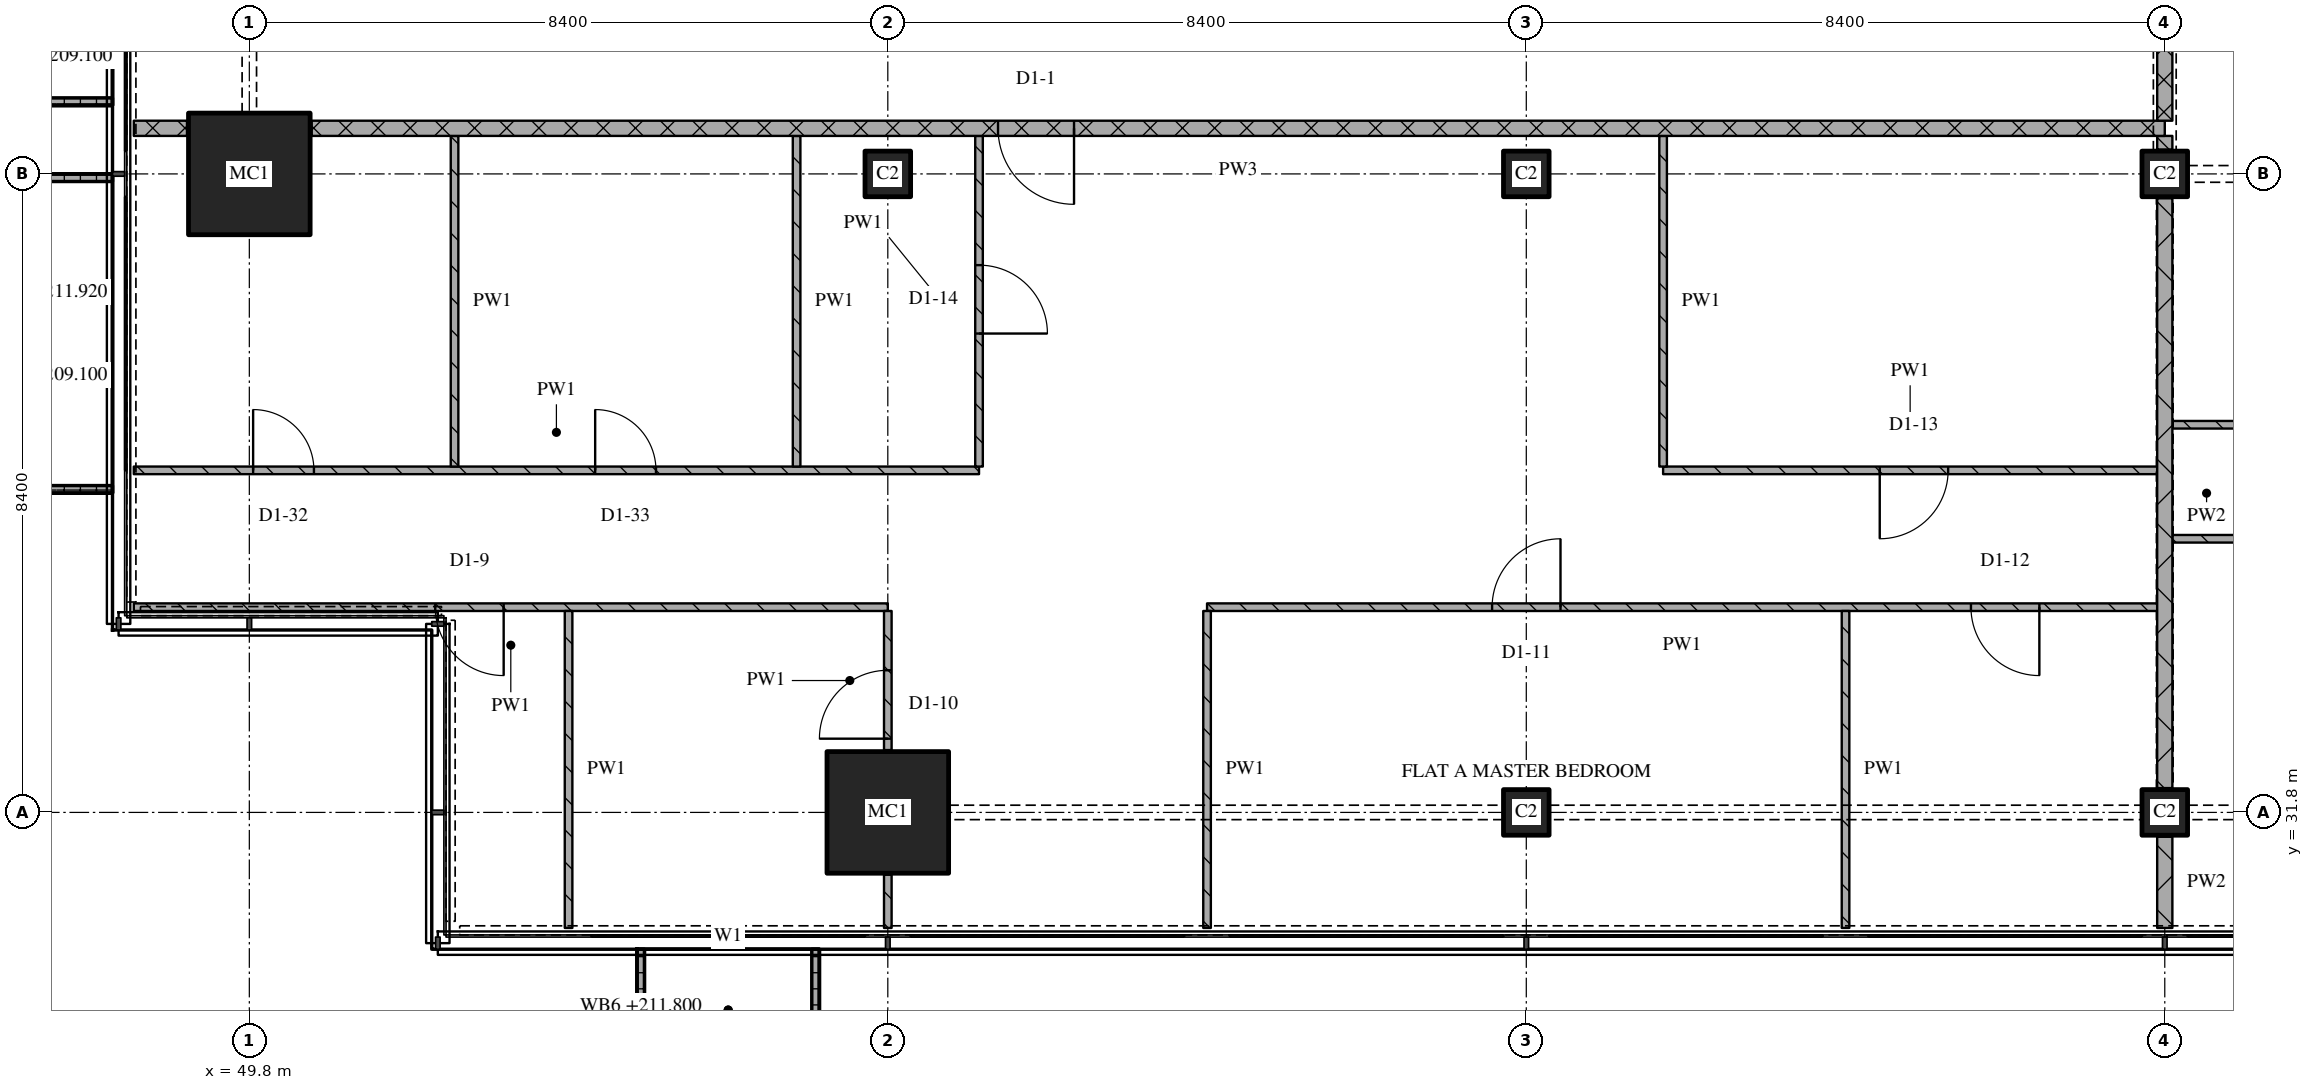
"""IFC4 building model, lengths in metres.
Left out: names, types, materials, properties, quantities, classifications, styles, units other than length and angle.
Written with IfcOpenShell. Run it as: python <this file> out.ifc"""

import sys

from ifc_helpers import new_model, si_unit, direction, frame, frame_2d, origin, origin_2d, place, context, subcontext, project, spatial, polyline, rectangle, outline, extrude, element, fill, save


model = new_model("IFC4")
c1 = context("Model", 3, precision=1e-05, world=origin(), true_north=direction((0.0, 1.0)))
c2 = subcontext(c1, "Body", "Model", "MODEL_VIEW")
j1 = project(units=[si_unit("LENGTHUNIT", "METRE"), si_unit("PLANEANGLEUNIT", "RADIAN")], contexts=[c1])
p1 = place(None, origin())
s1 = spatial("IfcSite", under=j1, at=p1, CompositionType="ELEMENT")
p2 = place(p1, origin())
s2 = spatial("IfcBuilding", under=s1, at=p2, CompositionType="ELEMENT")
p3 = place(p2, frame((0.0, 0.0, 209.1)))
s3 = spatial("IfcBuildingStorey", under=s2, at=p3, CompositionType="ELEMENT", Elevation=209.1)
for number, where, z_axis, x_axis in (
    (1, (49.8, 40.2, 0.0), (0.0, 0.0, 1.0), (1.0, 0.0, 0.0)),
    (2, (58.2, 31.8, 0.0), (0.0, 0.0, 1.0), (1.0, 0.0, 0.0)),
):
    element("IfcColumn", number, at=place(p3, frame(where, z_axis=z_axis, x_axis=x_axis)), inside=s3, PredefinedType="COLUMN", context=c2, shape_type="SweptSolid", body=[
        extrude(rectangle(XDim=1.6, YDim=1.6, at=origin_2d()), origin(), (0.0, 0.0, 1.0), 3.6),
    ])
for number, where, z_axis, x_axis in (
    (3, (58.2, 40.2, 0.0), (0.0, 0.0, 1.0), (1.0, 0.0, 0.0)),
    (4, (66.6, 31.8, 0.0), (0.0, 0.0, 1.0), (1.0, 0.0, 0.0)),
    (5, (66.6, 40.2, 0.0), (0.0, 0.0, 1.0), (1.0, 0.0, 0.0)),
    (6, (75.0, 31.8, 0.0), (0.0, 0.0, 1.0), (1.0, 0.0, 0.0)),
    (7, (75.0, 40.2, 0.0), (0.0, 0.0, 1.0), (1.0, 0.0, 0.0)),
):
    element("IfcColumn", number, at=place(p3, frame(where, z_axis=z_axis, x_axis=x_axis)), inside=s3, PredefinedType="COLUMN", context=c2, shape_type="SweptSolid", body=[
        extrude(rectangle(XDim=0.6, YDim=0.6, at=origin_2d()), origin(), (0.0, 0.0, 1.0), 3.6),
    ])
p4 = place(p3, origin())
e8 = element("IfcWall", 8, at=p4, inside=s3, PredefinedType="SOLIDWALL", context=c2, shape_type="SweptSolid", body=[
    extrude(outline(polyline([(54.9, 30.0), (55.0, 30.0), (55.0, 28.5), (57.2, 28.5), (57.2, 30.0), (57.3, 30.0), (57.3, 28.4), (54.9, 28.4), (54.9, 30.0)])), origin(), (0.0, 0.0, 1.0), 1.0),
])
p5 = place(p3, origin())
e9 = element("IfcWall", 9, at=p5, inside=s3, PredefinedType="SOLIDWALL", context=c2, shape_type="SweptSolid", body=[
    extrude(outline(polyline([(48.0, 43.5), (48.0, 43.4), (46.5, 43.4), (46.5, 41.2), (48.0, 41.2), (48.0, 41.1), (46.4, 41.1), (46.4, 43.5), (48.0, 43.5)])), origin(), (0.0, 0.0, 1.0), 1.0),
])
p6 = place(p3, origin())
e10 = element("IfcWall", 10, at=p6, inside=s3, PredefinedType="SOLIDWALL", context=c2, shape_type="SweptSolid", body=[
    extrude(outline(polyline([(48.0, 40.2), (48.0, 40.1), (46.367, 40.1), (46.367, 36.1), (48.0, 36.1), (48.0, 36.0), (46.267, 36.0), (46.267, 40.2), (48.0, 40.2)])), origin(), (0.0, 0.0, 1.0), 1.0),
])
p7 = place(p3, frame((58.2, 34.5, 0.0), z_axis=(0.0, 0.0, 1.0), x_axis=(-1.0, 0.0, 0.0)))
e11 = element("IfcWall", 11, at=p7, inside=s3, PredefinedType="PARTITIONING", context=c2, shape_type="SweptSolid", body=[
    extrude(rectangle(XDim=9.92, YDim=0.1, at=frame_2d((4.96, 0.0))), origin(), (0.0, 0.0, 1.0), 3.32),
])
p8 = place(p7, frame((5.054, 0.0, 0.0)))
e12 = element("IfcOpeningElement", 12, at=p8, cuts=e11, PredefinedType="OPENING", context=c2, shape_type="SweptSolid", body=[
    extrude(rectangle(XDim=0.9, YDim=2.1, at=frame_2d((0.45, 1.05))), frame((0.0, 0.06, 0.0), z_axis=(0.0, -1.0, 0.0), x_axis=(1.0, 0.0, 0.0)), (0.0, 0.0, 1.0), 0.12),
])
p9 = place(p3, frame((74.9, 34.5, 0.0), z_axis=(0.0, 0.0, 1.0), x_axis=(-1.0, 0.0, 0.0)))
e13 = element("IfcWall", 13, at=p9, inside=s3, PredefinedType="PARTITIONING", context=c2, shape_type="SweptSolid", body=[
    extrude(rectangle(XDim=12.5, YDim=0.1, at=frame_2d((6.25, 0.0))), origin(), (0.0, 0.0, 1.0), 3.32),
])
p10 = place(p9, frame((1.55, 0.0, 0.0)))
e14 = element("IfcOpeningElement", 14, at=p10, cuts=e13, PredefinedType="OPENING", context=c2, shape_type="SweptSolid", body=[
    extrude(rectangle(XDim=0.9, YDim=2.1, at=frame_2d((0.45, 1.05))), frame((0.0, 0.06, 0.0), z_axis=(0.0, -1.0, 0.0), x_axis=(1.0, 0.0, 0.0)), (0.0, 0.0, 1.0), 0.12),
])
p11 = place(p9, frame((7.85, 0.0, 0.0)))
e15 = element("IfcOpeningElement", 15, at=p11, cuts=e13, PredefinedType="OPENING", context=c2, shape_type="SweptSolid", body=[
    extrude(rectangle(XDim=0.9, YDim=2.1, at=frame_2d((0.45, 1.05))), frame((0.0, 0.06, 0.0), z_axis=(0.0, -1.0, 0.0), x_axis=(1.0, 0.0, 0.0)), (0.0, 0.0, 1.0), 0.12),
])
p12 = place(p3, frame((75.1, 35.4, 0.0), z_axis=(0.0, 0.0, 1.0), x_axis=(1.0, 0.0, 0.0)))
e16 = element("IfcWall", 16, at=p12, inside=s3, PredefinedType="PARTITIONING", context=c2, shape_type="SweptSolid", body=[
    extrude(rectangle(XDim=8.3, YDim=0.1, at=frame_2d((4.15, 0.0))), origin(), (0.0, 0.0, 1.0), 3.32),
])
p13 = place(p3, frame((48.28, 36.3, 0.0), z_axis=(0.0, 0.0, 1.0), x_axis=(1.0, 0.0, 0.0)))
e17 = element("IfcWall", 17, at=p13, inside=s3, PredefinedType="PARTITIONING", context=c2, shape_type="SweptSolid", body=[
    extrude(rectangle(XDim=11.12, YDim=0.1, at=frame_2d((5.56, 0.0))), origin(), (0.0, 0.0, 1.0), 3.32),
])
p14 = place(p13, frame((1.57, 0.0, 0.0)))
e18 = element("IfcOpeningElement", 18, at=p14, cuts=e17, PredefinedType="OPENING", context=c2, shape_type="SweptSolid", body=[
    extrude(rectangle(XDim=0.8, YDim=2.1, at=frame_2d((0.4, 1.05))), frame((0.0, 0.06, 0.0), z_axis=(0.0, -1.0, 0.0), x_axis=(1.0, 0.0, 0.0)), (0.0, 0.0, 1.0), 0.12),
])
p15 = place(p13, frame((6.07, 0.0, 0.0)))
e19 = element("IfcOpeningElement", 19, at=p15, cuts=e17, PredefinedType="OPENING", context=c2, shape_type="SweptSolid", body=[
    extrude(rectangle(XDim=0.8, YDim=2.1, at=frame_2d((0.4, 1.05))), frame((0.0, 0.06, 0.0), z_axis=(0.0, -1.0, 0.0), x_axis=(1.0, 0.0, 0.0)), (0.0, 0.0, 1.0), 0.12),
])
p16 = place(p3, frame((68.4, 36.3, 0.0), z_axis=(0.0, 0.0, 1.0), x_axis=(1.0, 0.0, 0.0)))
e20 = element("IfcWall", 20, at=p16, inside=s3, PredefinedType="PARTITIONING", context=c2, shape_type="SweptSolid", body=[
    extrude(rectangle(XDim=6.5, YDim=0.1, at=frame_2d((3.25, 0.0))), origin(), (0.0, 0.0, 1.0), 3.32),
])
p17 = place(p16, frame((2.85, 0.0, 0.0)))
e21 = element("IfcOpeningElement", 21, at=p17, cuts=e20, PredefinedType="OPENING", context=c2, shape_type="SweptSolid", body=[
    extrude(rectangle(XDim=0.9, YDim=2.1, at=frame_2d((0.45, 1.05))), frame((0.0, 0.06, 0.0), z_axis=(0.0, -1.0, 0.0), x_axis=(1.0, 0.0, 0.0)), (0.0, 0.0, 1.0), 0.12),
])
p18 = place(p3, frame((75.1, 36.9, 0.0), z_axis=(0.0, 0.0, 1.0), x_axis=(1.0, 0.0, 0.0)))
e22 = element("IfcWall", 22, at=p18, inside=s3, PredefinedType="PARTITIONING", context=c2, shape_type="SweptSolid", body=[
    extrude(rectangle(XDim=6.5, YDim=0.1, at=frame_2d((3.25, 0.0))), origin(), (0.0, 0.0, 1.0), 3.32),
])
p19 = place(p18, frame((1.603, 0.0, 0.0)))
e23 = element("IfcOpeningElement", 23, at=p19, cuts=e22, PredefinedType="OPENING", context=c2, shape_type="SweptSolid", body=[
    extrude(rectangle(XDim=0.8, YDim=2.1, at=frame_2d((0.4, 1.05))), frame((0.0, 0.06, 0.0), z_axis=(0.0, -1.0, 0.0), x_axis=(1.0, 0.0, 0.0)), (0.0, 0.0, 1.0), 0.12),
])
p20 = place(p3, frame((48.28, 40.8, 0.0), z_axis=(0.0, 0.0, 1.0), x_axis=(1.0, 0.0, 0.0)))
e24 = element("IfcWall", 24, at=p20, inside=s3, PredefinedType="PARTITIONING", context=c2, shape_type="SweptSolid", body=[
    extrude(rectangle(XDim=0.7, YDim=0.2, at=frame_2d((0.35, 0.0))), origin(), (0.0, 0.0, 1.0), 3.32),
])
p21 = place(p3, frame((75.0, 40.8, 0.0), z_axis=(0.0, 0.0, 1.0), x_axis=(-1.0, 0.0, 0.0)))
e25 = element("IfcWall", 25, at=p21, inside=s3, PredefinedType="PARTITIONING", context=c2, shape_type="SweptSolid", body=[
    extrude(rectangle(XDim=24.38, YDim=0.2, at=frame_2d((12.19, 0.0))), origin(), (0.0, 0.0, 1.0), 3.32),
])
p22 = place(p21, frame((14.35, 0.0, 0.0)))
e26 = element("IfcOpeningElement", 26, at=p22, cuts=e25, PredefinedType="OPENING", context=c2, shape_type="SweptSolid", body=[
    extrude(rectangle(XDim=1.0, YDim=2.1, at=frame_2d((0.5, 1.05))), frame((0.0, 0.11, 0.0), z_axis=(0.0, -1.0, 0.0), x_axis=(1.0, 0.0, 0.0)), (0.0, 0.0, 1.0), 0.22),
])
p23 = place(p3, frame((52.5, 40.7, 0.0), z_axis=(0.0, 0.0, 1.0), x_axis=(0.0, -1.0, 0.0)))
e27 = element("IfcWall", 27, at=p23, inside=s3, PredefinedType="PARTITIONING", context=c2, shape_type="SweptSolid", body=[
    extrude(rectangle(XDim=4.35, YDim=0.1, at=frame_2d((2.175, 0.0))), origin(), (0.0, 0.0, 1.0), 3.32),
])
p24 = place(p3, frame((54.0, 34.45, 0.0), z_axis=(0.0, 0.0, 1.0), x_axis=(0.0, -1.0, 0.0)))
e28 = element("IfcWall", 28, at=p24, inside=s3, PredefinedType="PARTITIONING", context=c2, shape_type="SweptSolid", body=[
    extrude(rectangle(XDim=4.17, YDim=0.1, at=frame_2d((2.085, 0.0))), origin(), (0.0, 0.0, 1.0), 3.32),
])
p25 = place(p3, frame((57.0, 40.7, 0.0), z_axis=(0.0, 0.0, 1.0), x_axis=(0.0, -1.0, 0.0)))
e29 = element("IfcWall", 29, at=p25, inside=s3, PredefinedType="PARTITIONING", context=c2, shape_type="SweptSolid", body=[
    extrude(rectangle(XDim=4.35, YDim=0.1, at=frame_2d((2.175, 0.0))), origin(), (0.0, 0.0, 1.0), 3.32),
])
p26 = place(p3, frame((58.2, 30.98, 0.0), z_axis=(0.0, 0.0, 1.0), x_axis=(0.0, -1.0, 0.0)))
e30 = element("IfcWall", 30, at=p26, inside=s3, PredefinedType="PARTITIONING", context=c2, shape_type="SweptSolid", body=[
    extrude(rectangle(XDim=0.7, YDim=0.1, at=frame_2d((0.35, 0.0))), origin(), (0.0, 0.0, 1.0), 3.32),
])
p27 = place(p3, frame((58.2, 32.62, 0.0), z_axis=(0.0, 0.0, 1.0), x_axis=(0.0, 1.0, 0.0)))
e31 = element("IfcWall", 31, at=p27, inside=s3, PredefinedType="PARTITIONING", context=c2, shape_type="SweptSolid", body=[
    extrude(rectangle(XDim=1.83, YDim=0.1, at=frame_2d((0.915, 0.0))), origin(), (0.0, 0.0, 1.0), 3.32),
])
p28 = place(p27, frame((0.15, 0.0, 0.0)))
e32 = element("IfcOpeningElement", 32, at=p28, cuts=e31, PredefinedType="OPENING", context=c2, shape_type="SweptSolid", body=[
    extrude(rectangle(XDim=0.9, YDim=2.1, at=frame_2d((0.45, 1.05))), frame((0.0, 0.06, 0.0), z_axis=(0.0, -1.0, 0.0), x_axis=(1.0, 0.0, 0.0)), (0.0, 0.0, 1.0), 0.12),
])
p29 = place(p3, frame((59.4, 36.35, 0.0), z_axis=(0.0, 0.0, 1.0), x_axis=(0.0, 1.0, 0.0)))
e33 = element("IfcWall", 33, at=p29, inside=s3, PredefinedType="PARTITIONING", context=c2, shape_type="SweptSolid", body=[
    extrude(rectangle(XDim=4.35, YDim=0.1, at=frame_2d((2.175, 0.0))), origin(), (0.0, 0.0, 1.0), 3.32),
])
p30 = place(p29, frame((1.75, 0.0, 0.0)))
e34 = element("IfcOpeningElement", 34, at=p30, cuts=e33, PredefinedType="OPENING", context=c2, shape_type="SweptSolid", body=[
    extrude(rectangle(XDim=0.9, YDim=2.1, at=frame_2d((0.45, 1.05))), frame((0.0, 0.06, 0.0), z_axis=(0.0, -1.0, 0.0), x_axis=(1.0, 0.0, 0.0)), (0.0, 0.0, 1.0), 0.12),
])
p31 = place(p3, frame((62.4, 34.45, 0.0), z_axis=(0.0, 0.0, 1.0), x_axis=(0.0, -1.0, 0.0)))
e35 = element("IfcWall", 35, at=p31, inside=s3, PredefinedType="PARTITIONING", context=c2, shape_type="SweptSolid", body=[
    extrude(rectangle(XDim=4.17, YDim=0.1, at=frame_2d((2.085, 0.0))), origin(), (0.0, 0.0, 1.0), 3.32),
])
p32 = place(p3, frame((68.4, 40.7, 0.0), z_axis=(0.0, 0.0, 1.0), x_axis=(0.0, -1.0, 0.0)))
e36 = element("IfcWall", 36, at=p32, inside=s3, PredefinedType="PARTITIONING", context=c2, shape_type="SweptSolid", body=[
    extrude(rectangle(XDim=4.35, YDim=0.1, at=frame_2d((2.175, 0.0))), origin(), (0.0, 0.0, 1.0), 3.32),
])
p33 = place(p3, frame((70.8, 34.45, 0.0), z_axis=(0.0, 0.0, 1.0), x_axis=(0.0, -1.0, 0.0)))
e37 = element("IfcWall", 37, at=p33, inside=s3, PredefinedType="PARTITIONING", context=c2, shape_type="SweptSolid", body=[
    extrude(rectangle(XDim=4.17, YDim=0.1, at=frame_2d((2.085, 0.0))), origin(), (0.0, 0.0, 1.0), 3.32),
])
p34 = place(p3, frame((75.0, 43.1, 0.0), z_axis=(0.0, 0.0, 1.0), x_axis=(0.0, -1.0, 0.0)))
e38 = element("IfcWall", 38, at=p34, inside=s3, PredefinedType="PARTITIONING", context=c2, shape_type="SweptSolid", body=[
    extrude(rectangle(XDim=2.2, YDim=0.2, at=frame_2d((1.1, 0.0))), origin(), (0.0, 0.0, 1.0), 2.53),
])
p35 = place(p3, frame((75.0, 31.48, 0.0), z_axis=(0.0, 0.0, 1.0), x_axis=(0.0, -1.0, 0.0)))
e39 = element("IfcWall", 39, at=p35, inside=s3, PredefinedType="PARTITIONING", context=c2, shape_type="SweptSolid", body=[
    extrude(rectangle(XDim=1.2, YDim=0.2, at=frame_2d((0.6, 0.0))), origin(), (0.0, 0.0, 1.0), 3.32),
])
p36 = place(p3, frame((75.0, 39.88, 0.0), z_axis=(0.0, 0.0, 1.0), x_axis=(0.0, -1.0, 0.0)))
e40 = element("IfcWall", 40, at=p36, inside=s3, PredefinedType="PARTITIONING", context=c2, shape_type="SweptSolid", body=[
    extrude(rectangle(XDim=7.76, YDim=0.2, at=frame_2d((3.88, 0.0))), origin(), (0.0, 0.0, 1.0), 2.72),
])
p37 = place(p3, frame((75.0, 40.7, 0.0), z_axis=(0.0, 0.0, 1.0), x_axis=(0.0, -1.0, 0.0)))
e41 = element("IfcWall", 41, at=p37, inside=s3, PredefinedType="PARTITIONING", context=c2, shape_type="SweptSolid", body=[
    extrude(rectangle(XDim=0.18, YDim=0.2, at=frame_2d((0.09, 0.0))), origin(), (0.0, 0.0, 1.0), 3.32),
])
p38 = place(p8, origin())
e42 = element("IfcDoor", 42, at=p38, inside=s3, OperationType="SINGLE_SWING_LEFT", PredefinedType="DOOR", context=c2, shape_type="SweptSolid", body=[
    extrude(rectangle(XDim=0.9, YDim=2.1, at=frame_2d((0.45, 1.05))), frame((0.0, 0.025, 0.0), z_axis=(0.0, -1.0, 0.0), x_axis=(1.0, 0.0, 0.0)), (0.0, 0.0, 1.0), 0.05),
])
fill(e12, e42)
p39 = place(p10, origin())
e43 = element("IfcDoor", 43, at=p39, inside=s3, OperationType="SINGLE_SWING_LEFT", PredefinedType="DOOR", context=c2, shape_type="SweptSolid", body=[
    extrude(rectangle(XDim=0.9, YDim=2.1, at=frame_2d((0.45, 1.05))), frame((0.0, 0.025, 0.0), z_axis=(0.0, -1.0, 0.0), x_axis=(1.0, 0.0, 0.0)), (0.0, 0.0, 1.0), 0.05),
])
fill(e14, e43)
p40 = place(p11, origin())
e44 = element("IfcDoor", 44, at=p40, inside=s3, OperationType="SINGLE_SWING_RIGHT", PredefinedType="DOOR", context=c2, shape_type="SweptSolid", body=[
    extrude(rectangle(XDim=0.9, YDim=2.1, at=frame_2d((0.45, 1.05))), frame((0.0, 0.025, 0.0), z_axis=(0.0, -1.0, 0.0), x_axis=(1.0, 0.0, 0.0)), (0.0, 0.0, 1.0), 0.05),
])
fill(e15, e44)
p41 = place(p14, origin())
e45 = element("IfcDoor", 45, at=p41, inside=s3, OperationType="SINGLE_SWING_LEFT", PredefinedType="DOOR", context=c2, shape_type="SweptSolid", body=[
    extrude(rectangle(XDim=0.8, YDim=2.1, at=frame_2d((0.4, 1.05))), frame((0.0, 0.025, 0.0), z_axis=(0.0, -1.0, 0.0), x_axis=(1.0, 0.0, 0.0)), (0.0, 0.0, 1.0), 0.05),
])
fill(e18, e45)
p42 = place(p15, origin())
e46 = element("IfcDoor", 46, at=p42, inside=s3, OperationType="SINGLE_SWING_LEFT", PredefinedType="DOOR", context=c2, shape_type="SweptSolid", body=[
    extrude(rectangle(XDim=0.8, YDim=2.1, at=frame_2d((0.4, 1.05))), frame((0.0, 0.025, 0.0), z_axis=(0.0, -1.0, 0.0), x_axis=(1.0, 0.0, 0.0)), (0.0, 0.0, 1.0), 0.05),
])
fill(e19, e46)
p43 = place(p17, origin())
e47 = element("IfcDoor", 47, at=p43, inside=s3, OperationType="SINGLE_SWING_RIGHT", PredefinedType="DOOR", context=c2, shape_type="SweptSolid", body=[
    extrude(rectangle(XDim=0.9, YDim=2.1, at=frame_2d((0.45, 1.05))), frame((0.0, 0.025, 0.0), z_axis=(0.0, -1.0, 0.0), x_axis=(1.0, 0.0, 0.0)), (0.0, 0.0, 1.0), 0.05),
])
fill(e21, e47)
p44 = place(p22, origin())
e48 = element("IfcDoor", 48, at=p44, inside=s3, OperationType="SINGLE_SWING_LEFT", PredefinedType="DOOR", context=c2, shape_type="SweptSolid", body=[
    extrude(rectangle(XDim=1.0, YDim=2.1, at=frame_2d((0.5, 1.05))), frame((0.0, 0.025, 0.0), z_axis=(0.0, -1.0, 0.0), x_axis=(1.0, 0.0, 0.0)), (0.0, 0.0, 1.0), 0.05),
])
fill(e26, e48)
p45 = place(p28, origin())
e49 = element("IfcDoor", 49, at=p45, inside=s3, OperationType="SINGLE_SWING_LEFT", PredefinedType="DOOR", context=c2, shape_type="SweptSolid", body=[
    extrude(rectangle(XDim=0.9, YDim=2.1, at=frame_2d((0.45, 1.05))), frame((0.0, 0.025, 0.0), z_axis=(0.0, -1.0, 0.0), x_axis=(1.0, 0.0, 0.0)), (0.0, 0.0, 1.0), 0.05),
])
fill(e32, e49)
p46 = place(p30, origin())
e50 = element("IfcDoor", 50, at=p46, inside=s3, OperationType="SINGLE_SWING_RIGHT", PredefinedType="DOOR", context=c2, shape_type="SweptSolid", body=[
    extrude(rectangle(XDim=0.9, YDim=2.1, at=frame_2d((0.45, 1.05))), frame((0.0, 0.025, 0.0), z_axis=(0.0, -1.0, 0.0), x_axis=(1.0, 0.0, 0.0)), (0.0, 0.0, 1.0), 0.05),
])
fill(e34, e50)
save(model, sys.argv[1])
